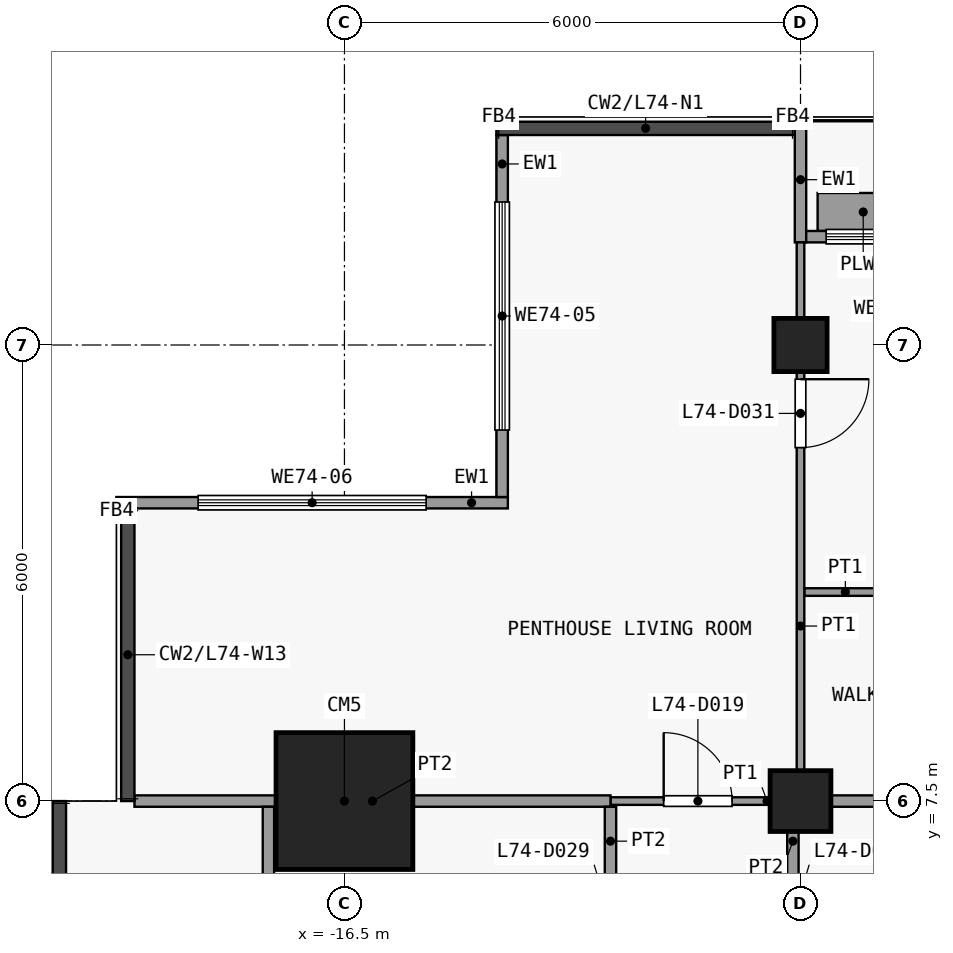
"""IFC4 building model, lengths in metres.
Left out: names, types, materials, properties, quantities, classifications, styles, units other than length and angle.
Written with IfcOpenShell. Run it as: python <this file> out.ifc"""

import sys

from ifc_helpers import new_model, si_unit, direction, frame, frame_2d, origin, origin_2d, place, context, subcontext, project, spatial, rectangle, extrude, element, fill, save


model = new_model("IFC4")
c1 = context("Model", 3, precision=1e-05, world=origin(), true_north=direction((0.0, 1.0)))
c2 = subcontext(c1, "Body", "Model", "MODEL_VIEW")
j1 = project(units=[si_unit("LENGTHUNIT", "METRE"), si_unit("PLANEANGLEUNIT", "RADIAN")], contexts=[c1])
p1 = place(None, origin())
s1 = spatial("IfcSite", under=j1, at=p1, CompositionType="ELEMENT")
p2 = place(p1, origin())
s2 = spatial("IfcBuilding", under=s1, at=p2, CompositionType="ELEMENT")
p3 = place(p2, frame((0.0, 0.0, 291.5)))
s3 = spatial("IfcBuildingStorey", under=s2, at=p3, CompositionType="ELEMENT", Elevation=291.5)
p4 = place(p3, frame((-16.5, 7.5, 0.0), z_axis=(0.0, 0.0, 1.0), x_axis=(1.0, 0.0, 0.0)))
e1 = element("IfcColumn", 1, at=p4, inside=s3, PredefinedType="COLUMN", context=c2, shape_type="SweptSolid", body=[
    extrude(rectangle(XDim=1.8, YDim=1.8, at=origin_2d()), origin(), (0.0, 0.0, 1.0), 3.6),
])
p5 = place(p3, frame((-10.5, 7.5, 0.0), z_axis=(0.0, 0.0, 1.0), x_axis=(1.0, 0.0, 0.0)))
e2 = element("IfcColumn", 2, at=p5, inside=s3, PredefinedType="COLUMN", context=c2, shape_type="SweptSolid", body=[
    extrude(rectangle(XDim=0.8, YDim=0.8, at=origin_2d()), origin(), (0.0, 0.0, 1.0), 3.6),
])
p6 = place(p3, frame((-10.5, 13.5, 0.0), z_axis=(0.0, 0.0, 1.0), x_axis=(1.0, 0.0, 0.0)))
e3 = element("IfcColumn", 3, at=p6, inside=s3, PredefinedType="COLUMN", context=c2, shape_type="SweptSolid", body=[
    extrude(rectangle(XDim=0.7, YDim=0.7, at=origin_2d()), origin(), (0.0, 0.0, 1.0), 3.6),
])
p7 = place(p3, frame((-14.425, 11.5, 0.0), z_axis=(0.0, 0.0, 1.0), x_axis=(0.0, 1.0, 0.0)))
e4 = element("IfcWall", 4, at=p7, inside=s3, PredefinedType="SOLIDWALL", context=c2, shape_type="SweptSolid", body=[
    extrude(rectangle(XDim=4.762, YDim=0.15, at=frame_2d((2.381, 0.0))), origin(), (0.0, 0.0, 1.0), 3.3),
])
p8 = place(p7, frame((0.881, 0.0, 0.9)))
e5 = element("IfcOpeningElement", 5, at=p8, cuts=e4, PredefinedType="OPENING", context=c2, shape_type="SweptSolid", body=[
    extrude(rectangle(XDim=3.0, YDim=2.4, at=frame_2d((1.5, 1.2))), frame((0.0, 0.085, 0.0), z_axis=(0.0, -1.0, 0.0), x_axis=(1.0, 0.0, 0.0)), (0.0, 0.0, 1.0), 0.17),
])
p9 = place(p3, frame((-19.5, 11.425, 0.0), z_axis=(0.0, 0.0, 1.0), x_axis=(1.0, 0.0, 0.0)))
e6 = element("IfcWall", 6, at=p9, inside=s3, PredefinedType="SOLIDWALL", context=c2, shape_type="SweptSolid", body=[
    extrude(rectangle(XDim=5.15, YDim=0.15, at=frame_2d((2.575, 0.0))), origin(), (0.0, 0.0, 1.0), 3.3),
])
p10 = place(p9, frame((1.075, 0.0, 0.9)))
e7 = element("IfcOpeningElement", 7, at=p10, cuts=e6, PredefinedType="OPENING", context=c2, shape_type="SweptSolid", body=[
    extrude(rectangle(XDim=3.0, YDim=2.4, at=frame_2d((1.5, 1.2))), frame((0.0, 0.085, 0.0), z_axis=(0.0, -1.0, 0.0), x_axis=(1.0, 0.0, 0.0)), (0.0, 0.0, 1.0), 0.17),
])
p11 = place(p3, frame((-10.5, 14.85, 0.0), z_axis=(0.0, 0.0, 1.0), x_axis=(0.0, 1.0, 0.0)))
e8 = element("IfcWall", 8, at=p11, inside=s3, PredefinedType="SOLIDWALL", context=c2, shape_type="SweptSolid", body=[
    extrude(rectangle(XDim=1.65, YDim=0.15, at=frame_2d((0.825, 0.0))), origin(), (0.0, 0.0, 1.0), 3.3),
])
p12 = place(p3, frame((-10.425, 14.925, 0.0), z_axis=(0.0, 0.0, 1.0), x_axis=(1.0, 0.0, 0.0)))
e9 = element("IfcWall", 9, at=p12, inside=s3, PredefinedType="SOLIDWALL", context=c2, shape_type="SweptSolid", body=[
    extrude(rectangle(XDim=5.85, YDim=0.15, at=frame_2d((2.925, 0.0))), origin(), (0.0, 0.0, 1.0), 3.3),
])
p13 = place(p12, frame((2.325, 0.0, 0.0)))
e10 = element("IfcOpeningElement", 10, at=p13, cuts=e9, PredefinedType="OPENING", context=c2, shape_type="SweptSolid", body=[
    extrude(rectangle(XDim=1.2, YDim=2.4, at=frame_2d((0.6, 1.2))), frame((0.0, 0.085, 0.0), z_axis=(0.0, -1.0, 0.0), x_axis=(1.0, 0.0, 0.0)), (0.0, 0.0, 1.0), 0.17),
])
p14 = place(p12, frame((0.262, 0.0, 0.9)))
e11 = element("IfcOpeningElement", 11, at=p14, cuts=e9, PredefinedType="OPENING", context=c2, shape_type="SweptSolid", body=[
    extrude(rectangle(XDim=1.8, YDim=2.1, at=frame_2d((0.9, 1.05))), frame((0.0, 0.085, 0.0), z_axis=(0.0, -1.0, 0.0), x_axis=(1.0, 0.0, 0.0)), (0.0, 0.0, 1.0), 0.17),
])
p15 = place(p12, frame((3.788, 0.0, 0.9)))
e12 = element("IfcOpeningElement", 12, at=p15, cuts=e9, PredefinedType="OPENING", context=c2, shape_type="SweptSolid", body=[
    extrude(rectangle(XDim=1.8, YDim=2.1, at=frame_2d((0.9, 1.05))), frame((0.0, 0.085, 0.0), z_axis=(0.0, -1.0, 0.0), x_axis=(1.0, 0.0, 0.0)), (0.0, 0.0, 1.0), 0.17),
])
p16 = place(p3, frame((-10.275, 15.25, 0.0), z_axis=(0.0, 0.0, 1.0), x_axis=(1.0, 0.0, 0.0)))
e13 = element("IfcWall", 13, at=p16, inside=s3, PredefinedType="USERDEFINED", context=c2, shape_type="SweptSolid", body=[
    extrude(rectangle(XDim=1.2, YDim=0.5, at=frame_2d((0.6, 0.0))), origin(), (0.0, 0.0, 1.0), 0.9),
])
p17 = place(p3, frame((-13.0, 7.5, 0.0), z_axis=(0.0, 0.0, 1.0), x_axis=(1.0, 0.0, 0.0)))
e14 = element("IfcWall", 14, at=p17, inside=s3, PredefinedType="PARTITIONING", context=c2, shape_type="SweptSolid", body=[
    extrude(rectangle(XDim=2.4, YDim=0.1, at=frame_2d((1.2, 0.0))), origin(), (0.0, 0.0, 1.0), 3.3),
])
p18 = place(p17, frame((0.7, 0.0, 0.0)))
e15 = element("IfcOpeningElement", 15, at=p18, cuts=e14, PredefinedType="OPENING", context=c2, shape_type="SweptSolid", body=[
    extrude(rectangle(XDim=0.9, YDim=2.1, at=frame_2d((0.45, 1.05))), frame((0.0, 0.06, 0.0), z_axis=(0.0, -1.0, 0.0), x_axis=(1.0, 0.0, 0.0)), (0.0, 0.0, 1.0), 0.12),
])
p19 = place(p3, frame((-19.262, 7.5, 0.0), z_axis=(0.0, 0.0, 1.0), x_axis=(1.0, 0.0, 0.0)))
e16 = element("IfcWall", 16, at=p19, inside=s3, PredefinedType="PARTITIONING", context=c2, shape_type="SweptSolid", body=[
    extrude(rectangle(XDim=6.262, YDim=0.15, at=frame_2d((3.131, 0.0))), origin(), (0.0, 0.0, 1.0), 3.3),
])
p20 = place(p3, frame((-10.5, 7.5, 0.0), z_axis=(0.0, 0.0, 1.0), x_axis=(1.0, 0.0, 0.0)))
e17 = element("IfcWall", 17, at=p20, inside=s3, PredefinedType="PARTITIONING", context=c2, shape_type="SweptSolid", body=[
    extrude(rectangle(XDim=2.9, YDim=0.15, at=frame_2d((1.45, 0.0))), origin(), (0.0, 0.0, 1.0), 3.3),
])
p21 = place(p3, frame((-10.45, 10.25, 0.0), z_axis=(0.0, 0.0, 1.0), x_axis=(1.0, 0.0, 0.0)))
e18 = element("IfcWall", 18, at=p21, inside=s3, PredefinedType="PARTITIONING", context=c2, shape_type="SweptSolid", body=[
    extrude(rectangle(XDim=3.25, YDim=0.1, at=frame_2d((1.625, 0.0))), origin(), (0.0, 0.0, 1.0), 3.3),
])
p22 = place(p21, frame((1.2, 0.0, 0.0)))
e19 = element("IfcOpeningElement", 19, at=p22, cuts=e18, PredefinedType="OPENING", context=c2, shape_type="SweptSolid", body=[
    extrude(rectangle(XDim=0.9, YDim=2.1, at=frame_2d((0.45, 1.05))), frame((0.0, 0.06, 0.0), z_axis=(0.0, -1.0, 0.0), x_axis=(1.0, 0.0, 0.0)), (0.0, 0.0, 1.0), 0.12),
])
p23 = place(p3, frame((-17.5, 4.6, 0.0), z_axis=(0.0, 0.0, 1.0), x_axis=(0.0, 1.0, 0.0)))
e20 = element("IfcWall", 20, at=p23, inside=s3, PredefinedType="PARTITIONING", context=c2, shape_type="SweptSolid", body=[
    extrude(rectangle(XDim=2.825, YDim=0.15, at=frame_2d((1.413, 0.0))), origin(), (0.0, 0.0, 1.0), 3.3),
])
p24 = place(p23, frame((1.0, 0.0, 0.0)))
e21 = element("IfcOpeningElement", 21, at=p24, cuts=e20, PredefinedType="OPENING", context=c2, shape_type="SweptSolid", body=[
    extrude(rectangle(XDim=0.9, YDim=2.1, at=frame_2d((0.45, 1.05))), frame((0.0, 0.085, 0.0), z_axis=(0.0, -1.0, 0.0), x_axis=(1.0, 0.0, 0.0)), (0.0, 0.0, 1.0), 0.17),
])
p25 = place(p3, frame((-13.0, 4.6, 0.0), z_axis=(0.0, 0.0, 1.0), x_axis=(0.0, 1.0, 0.0)))
e22 = element("IfcWall", 22, at=p25, inside=s3, PredefinedType="PARTITIONING", context=c2, shape_type="SweptSolid", body=[
    extrude(rectangle(XDim=2.825, YDim=0.15, at=frame_2d((1.413, 0.0))), origin(), (0.0, 0.0, 1.0), 3.3),
])
p26 = place(p25, frame((0.9, 0.0, 0.0)))
e23 = element("IfcOpeningElement", 23, at=p26, cuts=e22, PredefinedType="OPENING", context=c2, shape_type="SweptSolid", body=[
    extrude(rectangle(XDim=0.9, YDim=2.1, at=frame_2d((0.45, 1.05))), frame((0.0, 0.085, 0.0), z_axis=(0.0, -1.0, 0.0), x_axis=(1.0, 0.0, 0.0)), (0.0, 0.0, 1.0), 0.17),
])
p27 = place(p3, frame((-10.6, 4.6, 0.0), z_axis=(0.0, 0.0, 1.0), x_axis=(0.0, 1.0, 0.0)))
e24 = element("IfcWall", 24, at=p27, inside=s3, PredefinedType="PARTITIONING", context=c2, shape_type="SweptSolid", body=[
    extrude(rectangle(XDim=2.825, YDim=0.15, at=frame_2d((1.413, 0.0))), origin(), (0.0, 0.0, 1.0), 3.3),
])
p28 = place(p27, frame((0.9, 0.0, 0.0)))
e25 = element("IfcOpeningElement", 25, at=p28, cuts=e24, PredefinedType="OPENING", context=c2, shape_type="SweptSolid", body=[
    extrude(rectangle(XDim=0.9, YDim=2.1, at=frame_2d((0.45, 1.05))), frame((0.0, 0.085, 0.0), z_axis=(0.0, -1.0, 0.0), x_axis=(1.0, 0.0, 0.0)), (0.0, 0.0, 1.0), 0.17),
])
p29 = place(p3, frame((-10.5, 7.575, 0.0), z_axis=(0.0, 0.0, 1.0), x_axis=(0.0, 1.0, 0.0)))
e26 = element("IfcWall", 26, at=p29, inside=s3, PredefinedType="PARTITIONING", context=c2, shape_type="SweptSolid", body=[
    extrude(rectangle(XDim=7.275, YDim=0.1, at=frame_2d((3.638, 0.0))), origin(), (0.0, 0.0, 1.0), 3.3),
])
p30 = place(p29, frame((4.575, 0.0, 0.0)))
e27 = element("IfcOpeningElement", 27, at=p30, cuts=e26, PredefinedType="OPENING", context=c2, shape_type="SweptSolid", body=[
    extrude(rectangle(XDim=0.9, YDim=2.1, at=frame_2d((0.45, 1.05))), frame((0.0, 0.06, 0.0), z_axis=(0.0, -1.0, 0.0), x_axis=(1.0, 0.0, 0.0)), (0.0, 0.0, 1.0), 0.12),
])
p31 = place(p8, origin())
e28 = element("IfcWindow", 28, at=p31, inside=s3, PartitioningType="SINGLE_PANEL", PredefinedType="WINDOW", context=c2, shape_type="SweptSolid", body=[
    extrude(rectangle(XDim=3.0, YDim=2.4, at=frame_2d((1.5, 1.2))), frame((0.0, 0.03, 0.0), z_axis=(0.0, -1.0, 0.0), x_axis=(1.0, 0.0, 0.0)), (0.0, 0.0, 1.0), 0.06),
])
fill(e5, e28)
p32 = place(p10, origin())
e29 = element("IfcWindow", 29, at=p32, inside=s3, PartitioningType="SINGLE_PANEL", PredefinedType="WINDOW", context=c2, shape_type="SweptSolid", body=[
    extrude(rectangle(XDim=3.0, YDim=2.4, at=frame_2d((1.5, 1.2))), frame((0.0, 0.03, 0.0), z_axis=(0.0, -1.0, 0.0), x_axis=(1.0, 0.0, 0.0)), (0.0, 0.0, 1.0), 0.06),
])
fill(e7, e29)
p33 = place(p14, origin())
e30 = element("IfcWindow", 30, at=p33, inside=s3, PartitioningType="SINGLE_PANEL", PredefinedType="WINDOW", context=c2, shape_type="SweptSolid", body=[
    extrude(rectangle(XDim=1.8, YDim=2.1, at=frame_2d((0.9, 1.05))), frame((0.0, 0.03, 0.0), z_axis=(0.0, -1.0, 0.0), x_axis=(1.0, 0.0, 0.0)), (0.0, 0.0, 1.0), 0.06),
])
fill(e11, e30)
p34 = place(p18, origin())
e31 = element("IfcDoor", 31, at=p34, inside=s3, OperationType="SINGLE_SWING_RIGHT", PredefinedType="DOOR", context=c2, shape_type="SweptSolid", body=[
    extrude(rectangle(XDim=0.9, YDim=2.1, at=frame_2d((0.45, 1.05))), frame((0.0, 0.025, 0.0), z_axis=(0.0, -1.0, 0.0), x_axis=(1.0, 0.0, 0.0)), (0.0, 0.0, 1.0), 0.05),
])
fill(e15, e31)
p35 = place(p30, origin())
e32 = element("IfcDoor", 32, at=p35, inside=s3, OperationType="SINGLE_SWING_RIGHT", PredefinedType="DOOR", context=c2, shape_type="SweptSolid", body=[
    extrude(rectangle(XDim=0.9, YDim=2.1, at=frame_2d((0.45, 1.05))), frame((0.0, 0.025, 0.0), z_axis=(0.0, -1.0, 0.0), x_axis=(1.0, 0.0, 0.0)), (0.0, 0.0, 1.0), 0.05),
])
fill(e27, e32)
save(model, sys.argv[1])
